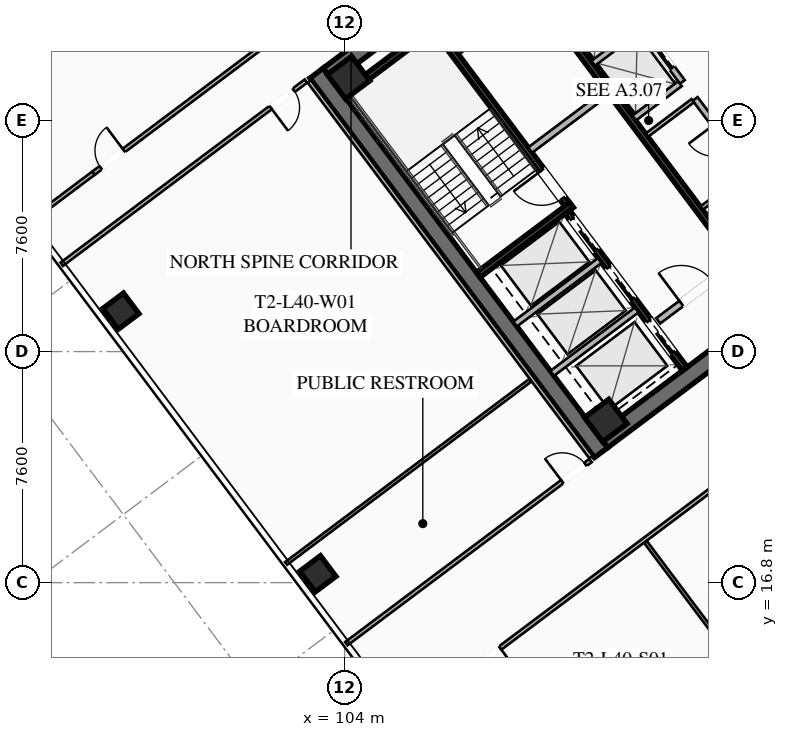
"""IFC4 building model, lengths in metres.
Left out: names, types, materials, properties, quantities, classifications, styles, units other than length and angle.
Written with IfcOpenShell. Run it as: python <this file> out.ifc"""

import sys

from ifc_helpers import new_model, si_unit, direction, frame, frame_2d, origin, origin_2d, place, context, subcontext, project, spatial, rectangle, hollow_rectangle, extrude, element, fill, save


model = new_model("IFC4")
c1 = context("Model", 3, precision=1e-05, world=origin(), true_north=direction((0.0, 1.0)))
c2 = subcontext(c1, "Body", "Model", "MODEL_VIEW")
j1 = project(units=[si_unit("LENGTHUNIT", "METRE"), si_unit("PLANEANGLEUNIT", "RADIAN")], contexts=[c1])
p1 = place(None, origin())
s1 = spatial("IfcSite", under=j1, at=p1, CompositionType="ELEMENT")
p2 = place(p1, origin())
s2 = spatial("IfcBuilding", under=s1, at=p2, CompositionType="ELEMENT")
p3 = place(p2, frame((0.0, 0.0, 149.9)))
s3 = spatial("IfcBuildingStorey", under=s2, at=p3, CompositionType="ELEMENT", Elevation=149.9)
for number, where, z_axis, x_axis in (
    (1, (112.436, 21.077, 0.0), (0.0, 0.0, 1.0), (-0.6, 0.8, 0.0)),
    (2, (115.564, 42.923, 0.0), (0.0, 0.0, 1.0), (0.6, -0.8, 0.0)),
):
    element("IfcWall", number, at=place(p3, frame(where, z_axis=z_axis, x_axis=x_axis)), inside=s3, PredefinedType="SHEAR", context=c2, shape_type="SweptSolid", body=[
        extrude(rectangle(XDim=15.6, YDim=0.55, at=frame_2d((7.8, 0.0))), origin(), (0.0, 0.0, 1.0), 3.55),
    ])
p4 = place(p3, frame((124.539, 30.498, 0.0), z_axis=(0.0, 0.0, 1.0), x_axis=(-0.799998054672, -0.600002593761, 0.0)))
e3 = element("IfcWall", 3, at=p4, inside=s3, PredefinedType="SHEAR", context=c2, shape_type="SweptSolid", body=[
    extrude(rectangle(XDim=15.06, YDim=0.55, at=frame_2d((7.53, 0.0))), origin(), (0.0, 0.0, 1.0), 3.55),
])
p5 = place(p4, frame((9.23, 0.0, 0.0)))
e4 = element("IfcOpeningElement", 4, at=p5, cuts=e3, PredefinedType="OPENING", context=c2, shape_type="SweptSolid", body=[
    extrude(rectangle(XDim=1.25, YDim=2.25, at=frame_2d((0.625, 1.125))), frame((0.0, 0.285, 0.0), z_axis=(0.0, -1.0, 0.0), x_axis=(1.0, 0.0, 0.0)), (0.0, 0.0, 1.0), 0.57),
])
p6 = place(p4, frame((4.18, 0.0, 0.0)))
e5 = element("IfcOpeningElement", 5, at=p6, cuts=e3, PredefinedType="OPENING", context=c2, shape_type="SweptSolid", body=[
    extrude(rectangle(XDim=1.25, YDim=2.25, at=frame_2d((0.625, 1.125))), frame((0.0, 0.285, 0.0), z_axis=(0.0, -1.0, 0.0), x_axis=(1.0, 0.0, 0.0)), (0.0, 0.0, 1.0), 0.57),
])
p7 = place(p3, frame((103.461, 33.502, 0.0), z_axis=(0.0, 0.0, 1.0), x_axis=(0.799998054672, 0.600002593761, 0.0)))
e6 = element("IfcWall", 6, at=p7, inside=s3, PredefinedType="SHEAR", context=c2, shape_type="SweptSolid", body=[
    extrude(rectangle(XDim=15.06, YDim=0.55, at=frame_2d((7.53, 0.0))), origin(), (0.0, 0.0, 1.0), 3.55),
])
p8 = place(p7, frame((4.58, 0.0, 0.0)))
e7 = element("IfcOpeningElement", 7, at=p8, cuts=e6, PredefinedType="OPENING", context=c2, shape_type="SweptSolid", body=[
    extrude(rectangle(XDim=1.25, YDim=2.25, at=frame_2d((0.625, 1.125))), frame((0.0, 0.285, 0.0), z_axis=(0.0, -1.0, 0.0), x_axis=(1.0, 0.0, 0.0)), (0.0, 0.0, 1.0), 0.57),
])
p9 = place(p7, frame((9.63, 0.0, 0.0)))
e8 = element("IfcOpeningElement", 8, at=p9, cuts=e6, PredefinedType="OPENING", context=c2, shape_type="SweptSolid", body=[
    extrude(rectangle(XDim=1.25, YDim=2.25, at=frame_2d((0.625, 1.125))), frame((0.0, 0.285, 0.0), z_axis=(0.0, -1.0, 0.0), x_axis=(1.0, 0.0, 0.0)), (0.0, 0.0, 1.0), 0.57),
])
for number, where, z_axis, x_axis in (
    (9, (112.59, 22.13, 0.0), (0.0, 0.0, 1.0), (0.8, 0.6, 0.0)),
    (10, (104.13, 33.41, 0.0), (0.0, 0.0, 1.0), (0.8, 0.6, 0.0)),
):
    element("IfcColumn", number, at=place(p3, frame(where, z_axis=z_axis, x_axis=x_axis)), inside=s3, PredefinedType="COLUMN", context=c2, shape_type="SweptSolid", body=[
        extrude(hollow_rectangle(XDim=1.0, YDim=1.0, WallThickness=0.04, at=origin_2d()), origin(), (0.0, 0.0, 1.0), 3.37),
    ])
for number, where, z_axis, x_axis in (
    (11, (96.64, 25.73, 0.0), (0.0, 0.0, 1.0), (0.8, 0.6, 0.0)),
    (12, (103.12, 17.09, 0.0), (0.0, 0.0, 1.0), (0.8, 0.6, 0.0)),
):
    element("IfcColumn", number, at=place(p3, frame(where, z_axis=z_axis, x_axis=x_axis)), inside=s3, PredefinedType="COLUMN", context=c2, shape_type="SweptSolid", body=[
        extrude(hollow_rectangle(XDim=0.85, YDim=0.85, WallThickness=0.035, at=origin_2d()), origin(), (0.0, 0.0, 1.0), 3.37),
    ])
p10 = place(p3, frame((111.44, 29.08, 0.0), z_axis=(0.0, 0.0, 1.0), x_axis=(-0.59999029481, 0.8000072788, 0.0)))
e13 = element("IfcWall", 13, at=p10, inside=s3, PredefinedType="SHEAR", context=c2, shape_type="SweptSolid", body=[
    extrude(rectangle(XDim=8.05, YDim=0.2, at=frame_2d((4.025, 0.0))), origin(), (0.0, 0.0, 1.0), 3.37),
])
p11 = place(p10, frame((0.45, 0.0, 0.0)))
e14 = element("IfcOpeningElement", 14, at=p11, cuts=e13, PredefinedType="OPENING", context=c2, shape_type="SweptSolid", body=[
    extrude(rectangle(XDim=1.15, YDim=2.2, at=frame_2d((0.575, 1.1))), frame((0.0, 0.11, 0.0), z_axis=(0.0, -1.0, 0.0), x_axis=(1.0, 0.0, 0.0)), (0.0, 0.0, 1.0), 0.22),
])
for number, where, z_axis, x_axis in (
    (15, (108.396, 26.922, 0.0), (0.0, 0.0, 1.0), (0.8, 0.6, 0.0)),
    (16, (103.956, 32.842, 0.0), (0.0, 0.0, 1.0), (0.8, 0.6, 0.0)),
):
    element("IfcWall", number, at=place(p3, frame(where, z_axis=z_axis, x_axis=x_axis)), inside=s3, PredefinedType="SHEAR", context=c2, shape_type="SweptSolid", body=[
        extrude(rectangle(XDim=3.83, YDim=0.2, at=frame_2d((1.915, 0.0))), origin(), (0.0, 0.0, 1.0), 3.37),
    ])
p12 = place(p3, frame((117.998, 25.936, 0.0), z_axis=(0.0, 0.0, 1.0), x_axis=(-0.600002693989, 0.799997979501, 0.0)))
e17 = element("IfcWall", 17, at=p12, inside=s3, PredefinedType="SHEAR", context=c2, shape_type="SweptSolid", body=[
    extrude(rectangle(XDim=14.5, YDim=0.2, at=frame_2d((7.25, 0.0))), origin(), (0.0, 0.0, 1.0), 3.37),
])
p13 = place(p3, frame((110.104, 31.028, 0.0), z_axis=(0.0, 0.0, 1.0), x_axis=(0.800018601094, 0.59997519774, 0.0)))
e18 = element("IfcWall", 18, at=p13, inside=s3, PredefinedType="SOLIDWALL", context=c2, shape_type="SweptSolid", body=[
    extrude(rectangle(XDim=3.15, YDim=0.22, at=frame_2d((1.575, 0.0))), origin(), (0.0, 0.0, 1.0), 2.723),
])
p14 = place(p3, frame((114.316, 25.412, 0.0), z_axis=(0.0, 0.0, 1.0), x_axis=(0.800018601094, 0.59997519774, 0.0)))
e19 = element("IfcWall", 19, at=p14, inside=s3, PredefinedType="SOLIDWALL", context=c2, shape_type="SweptSolid", body=[
    extrude(rectangle(XDim=3.15, YDim=0.22, at=frame_2d((1.575, 0.0))), origin(), (0.0, 0.0, 1.0), 2.723),
])
p15 = place(p14, frame((0.95, 0.0, 0.0)))
e20 = element("IfcOpeningElement", 20, at=p15, cuts=e19, PredefinedType="OPENING", context=c2, shape_type="SweptSolid", body=[
    extrude(rectangle(XDim=1.25, YDim=2.25, at=frame_2d((0.625, 1.125))), frame((0.0, 0.12, 0.0), z_axis=(0.0, -1.0, 0.0), x_axis=(1.0, 0.0, 0.0)), (0.0, 0.0, 1.0), 0.24),
])
p16 = place(p3, frame((115.19, 23.83, 0.0), z_axis=(0.0, 0.0, 1.0), x_axis=(-0.599993943644, 0.800004542231, 0.0)))
e21 = element("IfcWall", 21, at=p16, inside=s3, PredefinedType="SHEAR", context=c2, shape_type="SweptSolid", body=[
    extrude(rectangle(XDim=6.45, YDim=0.2, at=frame_2d((3.225, 0.0))), origin(), (0.0, 0.0, 1.0), 3.37),
])
p17 = place(p16, frame((4.875, 0.0, 0.0)))
e22 = element("IfcOpeningElement", 22, at=p17, cuts=e21, PredefinedType="OPENING", context=c2, shape_type="SweptSolid", body=[
    extrude(rectangle(XDim=1.3, YDim=2.25, at=frame_2d((0.65, 1.125))), frame((0.0, 0.11, 0.0), z_axis=(0.0, -1.0, 0.0), x_axis=(1.0, 0.0, 0.0)), (0.0, 0.0, 1.0), 0.22),
])
p18 = place(p16, frame((2.875, 0.0, 0.0)))
e23 = element("IfcOpeningElement", 23, at=p18, cuts=e21, PredefinedType="OPENING", context=c2, shape_type="SweptSolid", body=[
    extrude(rectangle(XDim=1.3, YDim=2.25, at=frame_2d((0.65, 1.125))), frame((0.0, 0.11, 0.0), z_axis=(0.0, -1.0, 0.0), x_axis=(1.0, 0.0, 0.0)), (0.0, 0.0, 1.0), 0.22),
])
p19 = place(p16, frame((0.675, 0.0, 0.0)))
e24 = element("IfcOpeningElement", 24, at=p19, cuts=e21, PredefinedType="OPENING", context=c2, shape_type="SweptSolid", body=[
    extrude(rectangle(XDim=1.3, YDim=2.25, at=frame_2d((0.65, 1.125))), frame((0.0, 0.11, 0.0), z_axis=(0.0, -1.0, 0.0), x_axis=(1.0, 0.0, 0.0)), (0.0, 0.0, 1.0), 0.22),
])
for number, where, z_axis, x_axis in (
    (25, (110.826, 23.682, 0.0), (0.0, 0.0, 1.0), (0.8, 0.6, 0.0)),
    (26, (109.608, 25.306, 0.0), (0.0, 0.0, 1.0), (0.8, 0.6, 0.0)),
):
    element("IfcWall", number, at=place(p3, frame(where, z_axis=z_axis, x_axis=x_axis)), inside=s3, PredefinedType="SOLIDWALL", context=c2, shape_type="SweptSolid", body=[
        extrude(rectangle(XDim=3.48, YDim=0.2, at=frame_2d((1.74, 0.0))), origin(), (0.0, 0.0, 1.0), 3.37),
    ])
p20 = place(p3, frame((107.71, 34.22, 0.0), z_axis=(0.0, 0.0, 1.0), x_axis=(0.799981399002, 0.60002480053, 0.0)))
e27 = element("IfcWall", 27, at=p20, inside=s3, PredefinedType="PARTITIONING", context=c2, shape_type="SweptSolid", body=[
    extrude(rectangle(XDim=3.15, YDim=0.135, at=frame_2d((1.575, 0.0))), origin(), (0.0, 0.0, 1.0), 2.723),
])
p21 = place(p20, frame((1.05, 0.0, 0.0)))
e28 = element("IfcOpeningElement", 28, at=p21, cuts=e27, PredefinedType="OPENING", context=c2, shape_type="SweptSolid", body=[
    extrude(rectangle(XDim=1.05, YDim=2.2, at=frame_2d((0.525, 1.1))), frame((0.0, 0.077, 0.0), z_axis=(0.0, -1.0, 0.0), x_axis=(1.0, 0.0, 0.0)), (0.0, 0.0, 1.0), 0.155),
])
p22 = place(p3, frame((119.67, 27.19, 0.0), z_axis=(0.0, 0.0, 1.0), x_axis=(-0.599988677396, 0.800008491828, 0.0)))
e29 = element("IfcWall", 29, at=p22, inside=s3, PredefinedType="SOLIDWALL", context=c2, shape_type="SweptSolid", body=[
    extrude(rectangle(XDim=6.9, YDim=0.2, at=frame_2d((3.45, 0.0))), origin(), (0.0, 0.0, 1.0), 2.723),
])
p23 = place(p22, frame((0.85, 0.0, 0.0)))
e30 = element("IfcOpeningElement", 30, at=p23, cuts=e29, PredefinedType="OPENING", context=c2, shape_type="SweptSolid", body=[
    extrude(rectangle(XDim=0.95, YDim=2.05, at=frame_2d((0.475, 1.025))), frame((0.0, 0.11, 0.0), z_axis=(0.0, -1.0, 0.0), x_axis=(1.0, 0.0, 0.0)), (0.0, 0.0, 1.0), 0.22),
])
p24 = place(p22, frame((4.8, 0.0, 0.0)))
e31 = element("IfcOpeningElement", 31, at=p24, cuts=e29, PredefinedType="OPENING", context=c2, shape_type="SweptSolid", body=[
    extrude(rectangle(XDim=1.05, YDim=2.2, at=frame_2d((0.525, 1.1))), frame((0.0, 0.11, 0.0), z_axis=(0.0, -1.0, 0.0), x_axis=(1.0, 0.0, 0.0)), (0.0, 0.0, 1.0), 0.22),
])
for number, where, z_axis, x_axis in (
    (32, (113.946, 31.522, 0.0), (0.0, 0.0, 1.0), (0.8, 0.6, 0.0)),
    (33, (115.746, 29.122, 0.0), (0.0, 0.0, 1.0), (0.8, 0.6, 0.0)),
):
    element("IfcWall", number, at=place(p3, frame(where, z_axis=z_axis, x_axis=x_axis)), inside=s3, PredefinedType="PARTITIONING", context=c2, shape_type="SweptSolid", body=[
        extrude(rectangle(XDim=1.88, YDim=0.135, at=frame_2d((0.94, 0.0))), origin(), (0.0, 0.0, 1.0), 2.723),
    ])
p25 = place(p3, frame((115.11, 33.27, 0.0), z_axis=(0.0, 0.0, 1.0), x_axis=(-0.600011322243, 0.799991508192, 0.0)))
e34 = element("IfcWall", 34, at=p25, inside=s3, PredefinedType="SOLIDWALL", context=c2, shape_type="SweptSolid", body=[
    extrude(rectangle(XDim=6.9, YDim=0.2, at=frame_2d((3.45, 0.0))), origin(), (0.0, 0.0, 1.0), 3.37),
])
p26 = place(p25, frame((0.575, 0.0, 0.0)))
e35 = element("IfcOpeningElement", 35, at=p26, cuts=e34, PredefinedType="OPENING", context=c2, shape_type="SweptSolid", body=[
    extrude(rectangle(XDim=1.1, YDim=2.2, at=frame_2d((0.55, 1.1))), frame((0.0, 0.11, 0.0), z_axis=(0.0, -1.0, 0.0), x_axis=(1.0, 0.0, 0.0)), (0.0, 0.0, 1.0), 0.22),
])
p27 = place(p25, frame((2.825, 0.0, 0.0)))
e36 = element("IfcOpeningElement", 36, at=p27, cuts=e34, PredefinedType="OPENING", context=c2, shape_type="SweptSolid", body=[
    extrude(rectangle(XDim=1.1, YDim=2.2, at=frame_2d((0.55, 1.1))), frame((0.0, 0.11, 0.0), z_axis=(0.0, -1.0, 0.0), x_axis=(1.0, 0.0, 0.0)), (0.0, 0.0, 1.0), 0.22),
])
p28 = place(p25, frame((5.075, 0.0, 0.0)))
e37 = element("IfcOpeningElement", 37, at=p28, cuts=e34, PredefinedType="OPENING", context=c2, shape_type="SweptSolid", body=[
    extrude(rectangle(XDim=1.1, YDim=2.2, at=frame_2d((0.55, 1.1))), frame((0.0, 0.11, 0.0), z_axis=(0.0, -1.0, 0.0), x_axis=(1.0, 0.0, 0.0)), (0.0, 0.0, 1.0), 0.22),
])
p29 = place(p3, frame((113.526, 32.082, 0.0), z_axis=(0.0, 0.0, 1.0), x_axis=(0.800046745961, 0.599937666993, 0.0)))
e38 = element("IfcWall", 38, at=p29, inside=s3, PredefinedType="SOLIDWALL", context=c2, shape_type="SweptSolid", body=[
    extrude(rectangle(XDim=1.88, YDim=0.2, at=frame_2d((0.94, 0.0))), origin(), (0.0, 0.0, 1.0), 3.37),
])
p30 = place(p3, frame((112.176, 33.882, 0.0), z_axis=(0.0, 0.0, 1.0), x_axis=(0.8, 0.6, 0.0)))
e39 = element("IfcWall", 39, at=p30, inside=s3, PredefinedType="SOLIDWALL", context=c2, shape_type="SweptSolid", body=[
    extrude(rectangle(XDim=1.88, YDim=0.2, at=frame_2d((0.94, 0.0))), origin(), (0.0, 0.0, 1.0), 3.37),
])
p31 = place(p3, frame((95.738, 30.266, 0.0), z_axis=(0.0, 0.0, 1.0), x_axis=(0.800003744006, 0.59999500796, 0.0)))
e40 = element("IfcWall", 40, at=p31, inside=s3, PredefinedType="PARTITIONING", context=c2, shape_type="SweptSolid", body=[
    extrude(rectangle(XDim=31.3, YDim=0.135, at=frame_2d((15.65, 0.0))), origin(), (0.0, 0.0, 1.0), 2.723),
])
p32 = place(p31, frame((0.3, 0.0, 0.0)))
e41 = element("IfcOpeningElement", 41, at=p32, cuts=e40, PredefinedType="OPENING", context=c2, shape_type="SweptSolid", body=[
    extrude(rectangle(XDim=0.95, YDim=2.05, at=frame_2d((0.475, 1.025))), frame((0.0, 0.077, 0.0), z_axis=(0.0, -1.0, 0.0), x_axis=(1.0, 0.0, 0.0)), (0.0, 0.0, 1.0), 0.155),
])
p33 = place(p31, frame((15.493, 0.0, 0.0)))
e42 = element("IfcOpeningElement", 42, at=p33, cuts=e40, PredefinedType="OPENING", context=c2, shape_type="SweptSolid", body=[
    extrude(rectangle(XDim=0.95, YDim=2.05, at=frame_2d((0.475, 1.025))), frame((0.0, 0.077, 0.0), z_axis=(0.0, -1.0, 0.0), x_axis=(1.0, 0.0, 0.0)), (0.0, 0.0, 1.0), 0.155),
])
p34 = place(p31, frame((30.05, 0.0, 0.0)))
e43 = element("IfcOpeningElement", 43, at=p34, cuts=e40, PredefinedType="OPENING", context=c2, shape_type="SweptSolid", body=[
    extrude(rectangle(XDim=0.95, YDim=2.05, at=frame_2d((0.475, 1.025))), frame((0.0, 0.077, 0.0), z_axis=(0.0, -1.0, 0.0), x_axis=(1.0, 0.0, 0.0)), (0.0, 0.0, 1.0), 0.155),
])
p35 = place(p3, frame((93.634, 28.688, 0.0), z_axis=(0.0, 0.0, 1.0), x_axis=(0.799977721118, 0.600029704027, 0.0)))
e44 = element("IfcWall", 44, at=p35, inside=s3, PredefinedType="PARTITIONING", context=c2, shape_type="SweptSolid", body=[
    extrude(rectangle(XDim=2.63, YDim=0.135, at=frame_2d((1.315, 0.0))), origin(), (0.0, 0.0, 1.0), 2.723),
])
p36 = place(p3, frame((133.09, 32.63, 0.0), z_axis=(0.0, 0.0, 1.0), x_axis=(-0.800003744006, -0.59999500796, 0.0)))
e45 = element("IfcWall", 45, at=p36, inside=s3, PredefinedType="PARTITIONING", context=c2, shape_type="SweptSolid", body=[
    extrude(rectangle(XDim=31.3, YDim=0.135, at=frame_2d((15.65, 0.0))), origin(), (0.0, 0.0, 1.0), 2.723),
])
p37 = place(p36, frame((29.97, 0.0, 0.0)))
e46 = element("IfcOpeningElement", 46, at=p37, cuts=e45, PredefinedType="OPENING", context=c2, shape_type="SweptSolid", body=[
    extrude(rectangle(XDim=0.95, YDim=2.05, at=frame_2d((0.475, 1.025))), frame((0.0, 0.077, 0.0), z_axis=(0.0, -1.0, 0.0), x_axis=(1.0, 0.0, 0.0)), (0.0, 0.0, 1.0), 0.155),
])
p38 = place(p36, frame((18.914, 0.0, 0.0)))
e47 = element("IfcOpeningElement", 47, at=p38, cuts=e45, PredefinedType="OPENING", context=c2, shape_type="SweptSolid", body=[
    extrude(rectangle(XDim=0.95, YDim=2.05, at=frame_2d((0.475, 1.025))), frame((0.0, 0.077, 0.0), z_axis=(0.0, -1.0, 0.0), x_axis=(1.0, 0.0, 0.0)), (0.0, 0.0, 1.0), 0.155),
])
p39 = place(p36, frame((0.38, 0.0, 0.0)))
e48 = element("IfcOpeningElement", 48, at=p39, cuts=e45, PredefinedType="OPENING", context=c2, shape_type="SweptSolid", body=[
    extrude(rectangle(XDim=0.95, YDim=2.05, at=frame_2d((0.475, 1.025))), frame((0.0, 0.077, 0.0), z_axis=(0.0, -1.0, 0.0), x_axis=(1.0, 0.0, 0.0)), (0.0, 0.0, 1.0), 0.155),
])
p40 = place(p3, frame((118.248, 12.336, 0.0), z_axis=(0.0, 0.0, 1.0), x_axis=(-0.600005387845, 0.799995959088, 0.0)))
e49 = element("IfcWall", 49, at=p40, inside=s3, PredefinedType="PARTITIONING", context=c2, shape_type="SweptSolid", body=[
    extrude(rectangle(XDim=7.25, YDim=0.11, at=frame_2d((3.625, 0.0))), origin(), (0.0, 0.0, 1.0), 2.723),
])
p41 = place(p3, frame((112.104, 20.928, 0.0), z_axis=(0.0, 0.0, 1.0), x_axis=(-0.599994940075, 0.800003794918, 0.0)))
e50 = element("IfcWall", 50, at=p41, inside=s3, PredefinedType="PARTITIONING", context=c2, shape_type="SweptSolid", body=[
    extrude(rectangle(XDim=15.44, YDim=0.135, at=frame_2d((7.72, 0.0))), origin(), (0.0, 0.0, 1.0), 2.723),
])
p42 = place(p3, frame((102.728, 33.296, 0.0), z_axis=(0.0, 0.0, 1.0), x_axis=(-0.800002918023, -0.599996109283, 0.0)))
e51 = element("IfcWall", 51, at=p42, inside=s3, PredefinedType="PARTITIONING", context=c2, shape_type="SweptSolid", body=[
    extrude(rectangle(XDim=10.04, YDim=0.135, at=frame_2d((5.02, 0.0))), origin(), (0.0, 0.0, 1.0), 2.723),
])
p43 = place(p42, frame((0.5, 0.0, 0.0)))
e52 = element("IfcOpeningElement", 52, at=p43, cuts=e51, PredefinedType="OPENING", context=c2, shape_type="SweptSolid", body=[
    extrude(rectangle(XDim=0.95, YDim=2.05, at=frame_2d((0.475, 1.025))), frame((0.0, 0.077, 0.0), z_axis=(0.0, -1.0, 0.0), x_axis=(1.0, 0.0, 0.0)), (0.0, 0.0, 1.0), 0.155),
])
p44 = place(p3, frame((104.056, 14.792, 0.0), z_axis=(0.0, 0.0, 1.0), x_axis=(0.800002918023, 0.599996109283, 0.0)))
e53 = element("IfcWall", 53, at=p44, inside=s3, PredefinedType="PARTITIONING", context=c2, shape_type="SweptSolid", body=[
    extrude(rectangle(XDim=10.04, YDim=0.135, at=frame_2d((5.02, 0.0))), origin(), (0.0, 0.0, 1.0), 2.723),
])
p45 = place(p44, frame((8.88, 0.0, 0.0)))
e54 = element("IfcOpeningElement", 54, at=p45, cuts=e53, PredefinedType="OPENING", context=c2, shape_type="SweptSolid", body=[
    extrude(rectangle(XDim=0.95, YDim=2.05, at=frame_2d((0.475, 1.025))), frame((0.0, 0.077, 0.0), z_axis=(0.0, -1.0, 0.0), x_axis=(1.0, 0.0, 0.0)), (0.0, 0.0, 1.0), 0.155),
])
p46 = place(p3, frame((102.076, 17.432, 0.0), z_axis=(0.0, 0.0, 1.0), x_axis=(0.799991245945, 0.600011671896, 0.0)))
e55 = element("IfcWall", 55, at=p46, inside=s3, PredefinedType="PARTITIONING", context=c2, shape_type="SweptSolid", body=[
    extrude(rectangle(XDim=10.04, YDim=0.11, at=frame_2d((5.02, 0.0))), origin(), (0.0, 0.0, 1.0), 2.723),
])
p47 = place(p11, origin())
e56 = element("IfcDoor", 56, at=p47, inside=s3, OperationType="SINGLE_SWING_RIGHT", PredefinedType="DOOR", context=c2, shape_type="SweptSolid", body=[
    extrude(rectangle(XDim=1.15, YDim=2.2, at=frame_2d((0.575, 1.1))), frame((0.0, 0.025, 0.0), z_axis=(0.0, -1.0, 0.0), x_axis=(1.0, 0.0, 0.0)), (0.0, 0.0, 1.0), 0.05),
])
fill(e14, e56)
p48 = place(p15, origin())
e57 = element("IfcDoor", 57, at=p48, inside=s3, OperationType="SINGLE_SWING_LEFT", PredefinedType="DOOR", context=c2, shape_type="SweptSolid", body=[
    extrude(rectangle(XDim=1.25, YDim=2.25, at=frame_2d((0.625, 1.125))), frame((0.0, 0.025, 0.0), z_axis=(0.0, -1.0, 0.0), x_axis=(1.0, 0.0, 0.0)), (0.0, 0.0, 1.0), 0.05),
])
fill(e20, e57)
p49 = place(p32, origin())
e58 = element("IfcDoor", 58, at=p49, inside=s3, OperationType="SINGLE_SWING_RIGHT", PredefinedType="DOOR", context=c2, shape_type="SweptSolid", body=[
    extrude(rectangle(XDim=0.95, YDim=2.05, at=frame_2d((0.475, 1.025))), frame((0.0, 0.025, 0.0), z_axis=(0.0, -1.0, 0.0), x_axis=(1.0, 0.0, 0.0)), (0.0, 0.0, 1.0), 0.05),
])
fill(e41, e58)
p50 = place(p37, origin())
e59 = element("IfcDoor", 59, at=p50, inside=s3, OperationType="SINGLE_SWING_LEFT", PredefinedType="DOOR", context=c2, shape_type="SweptSolid", body=[
    extrude(rectangle(XDim=0.95, YDim=2.05, at=frame_2d((0.475, 1.025))), frame((0.0, 0.025, 0.0), z_axis=(0.0, -1.0, 0.0), x_axis=(1.0, 0.0, 0.0)), (0.0, 0.0, 1.0), 0.05),
])
fill(e46, e59)
p51 = place(p43, origin())
e60 = element("IfcDoor", 60, at=p51, inside=s3, OperationType="SINGLE_SWING_RIGHT", PredefinedType="DOOR", context=c2, shape_type="SweptSolid", body=[
    extrude(rectangle(XDim=0.95, YDim=2.05, at=frame_2d((0.475, 1.025))), frame((0.0, 0.025, 0.0), z_axis=(0.0, -1.0, 0.0), x_axis=(1.0, 0.0, 0.0)), (0.0, 0.0, 1.0), 0.05),
])
fill(e52, e60)
p52 = place(p45, origin())
e61 = element("IfcDoor", 61, at=p52, inside=s3, OperationType="SINGLE_SWING_LEFT", PredefinedType="DOOR", context=c2, shape_type="SweptSolid", body=[
    extrude(rectangle(XDim=0.95, YDim=2.05, at=frame_2d((0.475, 1.025))), frame((0.0, 0.025, 0.0), z_axis=(0.0, -1.0, 0.0), x_axis=(1.0, 0.0, 0.0)), (0.0, 0.0, 1.0), 0.05),
])
fill(e54, e61)
p53 = place(p17, origin())
e62 = element("IfcDoor", 62, at=p53, inside=s3, OperationType="SLIDING_TO_LEFT", PredefinedType="DOOR", context=c2, shape_type="SweptSolid", body=[
    extrude(rectangle(XDim=1.3, YDim=2.25, at=frame_2d((0.65, 1.125))), frame((0.0, 0.025, 0.0), z_axis=(0.0, -1.0, 0.0), x_axis=(1.0, 0.0, 0.0)), (0.0, 0.0, 1.0), 0.05),
])
fill(e22, e62)
p54 = place(p18, origin())
e63 = element("IfcDoor", 63, at=p54, inside=s3, OperationType="SLIDING_TO_LEFT", PredefinedType="DOOR", context=c2, shape_type="SweptSolid", body=[
    extrude(rectangle(XDim=1.3, YDim=2.25, at=frame_2d((0.65, 1.125))), frame((0.0, 0.025, 0.0), z_axis=(0.0, -1.0, 0.0), x_axis=(1.0, 0.0, 0.0)), (0.0, 0.0, 1.0), 0.05),
])
fill(e23, e63)
p55 = place(p19, origin())
e64 = element("IfcDoor", 64, at=p55, inside=s3, OperationType="SLIDING_TO_LEFT", PredefinedType="DOOR", context=c2, shape_type="SweptSolid", body=[
    extrude(rectangle(XDim=1.3, YDim=2.25, at=frame_2d((0.65, 1.125))), frame((0.0, 0.025, 0.0), z_axis=(0.0, -1.0, 0.0), x_axis=(1.0, 0.0, 0.0)), (0.0, 0.0, 1.0), 0.05),
])
fill(e24, e64)
p56 = place(p26, origin())
e65 = element("IfcDoor", 65, at=p56, inside=s3, OperationType="SLIDING_TO_LEFT", PredefinedType="DOOR", context=c2, shape_type="SweptSolid", body=[
    extrude(rectangle(XDim=1.1, YDim=2.2, at=frame_2d((0.55, 1.1))), frame((0.0, 0.025, 0.0), z_axis=(0.0, -1.0, 0.0), x_axis=(1.0, 0.0, 0.0)), (0.0, 0.0, 1.0), 0.05),
])
fill(e35, e65)
save(model, sys.argv[1])
